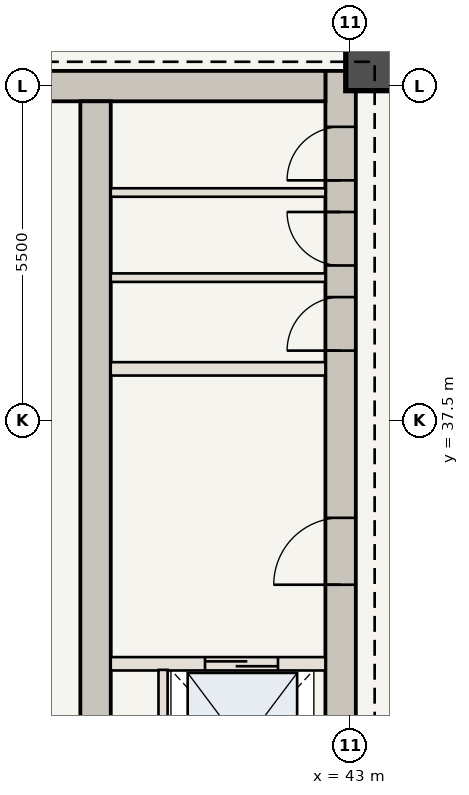
"""IFC4 building model, lengths in metres.
Left out: names, types, materials, properties, quantities, classifications, styles, units other than length and angle.
Written with IfcOpenShell. Run it as: python <this file> out.ifc"""

import sys

from ifc_helpers import new_model, si_unit, direction, frame, frame_2d, origin, origin_2d, place, context, subcontext, project, spatial, rectangle, extrude, element, fill, save


model = new_model("IFC4")
c1 = context("Model", 3, precision=1e-05, world=origin(), true_north=direction((0.0, 1.0)))
c2 = subcontext(c1, "Body", "Model", "MODEL_VIEW")
j1 = project(units=[si_unit("LENGTHUNIT", "METRE"), si_unit("PLANEANGLEUNIT", "RADIAN")], contexts=[c1])
p1 = place(None, origin())
s1 = spatial("IfcSite", under=j1, at=p1, CompositionType="ELEMENT")
p2 = place(p1, origin())
s2 = spatial("IfcBuilding", under=s1, at=p2, CompositionType="ELEMENT")
p3 = place(p2, frame((0.0, 0.0, 225.4)))
s3 = spatial("IfcBuildingStorey", under=s2, at=p3, CompositionType="ELEMENT", Elevation=225.4)
p4 = place(p3, frame((42.84, 30.6, 0.0), z_axis=(0.0, 0.0, 1.0), x_axis=(0.0, 1.0, 0.0)))
e1 = element("IfcWall", 1, at=p4, inside=s3, PredefinedType="SHEAR", context=c2, shape_type="SweptSolid", body=[
    extrude(rectangle(XDim=12.65, YDim=0.5, at=frame_2d((6.325, 0.0))), origin(), (0.0, 0.0, 1.0), 3.85),
])
p5 = place(p4, frame((4.2, 0.0, 0.0)))
e2 = element("IfcOpeningElement", 2, at=p5, cuts=e1, PredefinedType="OPENING", context=c2, shape_type="SweptSolid", body=[
    extrude(rectangle(XDim=1.1, YDim=2.15, at=frame_2d((0.55, 1.075))), frame((0.0, 0.26, 0.0), z_axis=(0.0, -1.0, 0.0), x_axis=(1.0, 0.0, 0.0)), (0.0, 0.0, 1.0), 0.52),
])
p6 = place(p4, frame((8.05, 0.0, 0.0)))
e3 = element("IfcOpeningElement", 3, at=p6, cuts=e1, PredefinedType="OPENING", context=c2, shape_type="SweptSolid", body=[
    extrude(rectangle(XDim=0.88, YDim=2.1, at=frame_2d((0.44, 1.05))), frame((0.0, 0.26, 0.0), z_axis=(0.0, -1.0, 0.0), x_axis=(1.0, 0.0, 0.0)), (0.0, 0.0, 1.0), 0.52),
])
p7 = place(p4, frame((9.45, 0.0, 0.0)))
e4 = element("IfcOpeningElement", 4, at=p7, cuts=e1, PredefinedType="OPENING", context=c2, shape_type="SweptSolid", body=[
    extrude(rectangle(XDim=0.88, YDim=2.1, at=frame_2d((0.44, 1.05))), frame((0.0, 0.26, 0.0), z_axis=(0.0, -1.0, 0.0), x_axis=(1.0, 0.0, 0.0)), (0.0, 0.0, 1.0), 0.52),
])
p8 = place(p4, frame((10.85, 0.0, 0.0)))
e5 = element("IfcOpeningElement", 5, at=p8, cuts=e1, PredefinedType="OPENING", context=c2, shape_type="SweptSolid", body=[
    extrude(rectangle(XDim=0.88, YDim=2.1, at=frame_2d((0.44, 1.05))), frame((0.0, 0.26, 0.0), z_axis=(0.0, -1.0, 0.0), x_axis=(1.0, 0.0, 0.0)), (0.0, 0.0, 1.0), 0.52),
])
p9 = place(p3, frame((37.75, 43.0, 0.0), z_axis=(0.0, 0.0, 1.0), x_axis=(1.0, 0.0, 0.0)))
e6 = element("IfcWall", 6, at=p9, inside=s3, PredefinedType="SHEAR", context=c2, shape_type="SweptSolid", body=[
    extrude(rectangle(XDim=4.84, YDim=0.5, at=frame_2d((2.42, 0.0))), origin(), (0.0, 0.0, 1.0), 3.85),
])
p10 = place(p3, frame((38.81, 30.6, 0.0), z_axis=(0.0, 0.0, 1.0), x_axis=(0.0, 1.0, 0.0)))
e7 = element("IfcWall", 7, at=p10, inside=s3, PredefinedType="SHEAR", context=c2, shape_type="SweptSolid", body=[
    extrude(rectangle(XDim=12.15, YDim=0.5, at=frame_2d((6.075, 0.0))), origin(), (0.0, 0.0, 1.0), 3.85),
])
p11 = place(p3, frame((43.35, 43.35, 0.0), z_axis=(0.0, 0.0, 1.0), x_axis=(1.0, 0.0, 0.0)))
e8 = element("IfcColumn", 8, at=p11, inside=s3, PredefinedType="COLUMN", context=c2, shape_type="SweptSolid", body=[
    extrude(rectangle(XDim=0.85, YDim=0.85, at=origin_2d()), origin(), (0.0, 0.0, 1.0), 3.85),
])
p12 = place(p3, frame((39.06, 33.5, 0.0), z_axis=(0.0, 0.0, 1.0), x_axis=(1.0, 0.0, 0.0)))
e9 = element("IfcWall", 9, at=p12, inside=s3, PredefinedType="STANDARD", context=c2, shape_type="SweptSolid", body=[
    extrude(rectangle(XDim=3.53, YDim=0.22, at=frame_2d((1.765, 0.0))), origin(), (0.0, 0.0, 1.0), 3.685),
])
p13 = place(p12, frame((1.55, 0.0, 0.0)))
e10 = element("IfcOpeningElement", 10, at=p13, cuts=e9, PredefinedType="OPENING", context=c2, shape_type="SweptSolid", body=[
    extrude(rectangle(XDim=1.2, YDim=2.2, at=frame_2d((0.6, 1.1))), frame((0.0, 0.12, 0.0), z_axis=(0.0, -1.0, 0.0), x_axis=(1.0, 0.0, 0.0)), (0.0, 0.0, 1.0), 0.24),
])
p14 = place(p3, frame((39.92, 30.75, 0.0), z_axis=(0.0, 0.0, 1.0), x_axis=(0.0, 1.0, 0.0)))
e11 = element("IfcWall", 11, at=p14, inside=s3, PredefinedType="STANDARD", context=c2, shape_type="SweptSolid", body=[
    extrude(rectangle(XDim=2.65, YDim=0.15, at=frame_2d((1.325, 0.0))), origin(), (0.0, 0.0, 1.0), 3.685),
])
p15 = place(p3, frame((39.06, 38.35, 0.0), z_axis=(0.0, 0.0, 1.0), x_axis=(1.0, 0.0, 0.0)))
e12 = element("IfcWall", 12, at=p15, inside=s3, PredefinedType="STANDARD", context=c2, shape_type="SweptSolid", body=[
    extrude(rectangle(XDim=3.53, YDim=0.22, at=frame_2d((1.765, 0.0))), origin(), (0.0, 0.0, 1.0), 3.685),
])
for number, where, z_axis, x_axis in (
    (13, (39.06, 39.85, 0.0), (0.0, 0.0, 1.0), (1.0, 0.0, 0.0)),
    (14, (39.06, 41.25, 0.0), (0.0, 0.0, 1.0), (1.0, 0.0, 0.0)),
):
    element("IfcWall", number, at=place(p3, frame(where, z_axis=z_axis, x_axis=x_axis)), inside=s3, PredefinedType="STANDARD", context=c2, shape_type="SweptSolid", body=[
        extrude(rectangle(XDim=3.53, YDim=0.14, at=frame_2d((1.765, 0.0))), origin(), (0.0, 0.0, 1.0), 3.685),
    ])
p16 = place(p5, origin())
e15 = element("IfcDoor", 15, at=p16, inside=s3, OperationType="SINGLE_SWING_LEFT", PredefinedType="DOOR", context=c2, shape_type="SweptSolid", body=[
    extrude(rectangle(XDim=1.1, YDim=2.15, at=frame_2d((0.55, 1.075))), frame((0.0, 0.025, 0.0), z_axis=(0.0, -1.0, 0.0), x_axis=(1.0, 0.0, 0.0)), (0.0, 0.0, 1.0), 0.05),
])
fill(e2, e15)
p17 = place(p6, origin())
e16 = element("IfcDoor", 16, at=p17, inside=s3, OperationType="SINGLE_SWING_LEFT", PredefinedType="DOOR", context=c2, shape_type="SweptSolid", body=[
    extrude(rectangle(XDim=0.88, YDim=2.1, at=frame_2d((0.44, 1.05))), frame((0.0, 0.025, 0.0), z_axis=(0.0, -1.0, 0.0), x_axis=(1.0, 0.0, 0.0)), (0.0, 0.0, 1.0), 0.05),
])
fill(e3, e16)
p18 = place(p7, origin())
e17 = element("IfcDoor", 17, at=p18, inside=s3, OperationType="SINGLE_SWING_RIGHT", PredefinedType="DOOR", context=c2, shape_type="SweptSolid", body=[
    extrude(rectangle(XDim=0.88, YDim=2.1, at=frame_2d((0.44, 1.05))), frame((0.0, 0.025, 0.0), z_axis=(0.0, -1.0, 0.0), x_axis=(1.0, 0.0, 0.0)), (0.0, 0.0, 1.0), 0.05),
])
fill(e4, e17)
p19 = place(p8, origin())
e18 = element("IfcDoor", 18, at=p19, inside=s3, OperationType="SINGLE_SWING_LEFT", PredefinedType="DOOR", context=c2, shape_type="SweptSolid", body=[
    extrude(rectangle(XDim=0.88, YDim=2.1, at=frame_2d((0.44, 1.05))), frame((0.0, 0.025, 0.0), z_axis=(0.0, -1.0, 0.0), x_axis=(1.0, 0.0, 0.0)), (0.0, 0.0, 1.0), 0.05),
])
fill(e5, e18)
p20 = place(p13, origin())
e19 = element("IfcDoor", 19, at=p20, inside=s3, OperationType="DOUBLE_DOOR_SLIDING", PredefinedType="DOOR", context=c2, shape_type="SweptSolid", body=[
    extrude(rectangle(XDim=1.2, YDim=2.2, at=frame_2d((0.6, 1.1))), frame((0.0, 0.025, 0.0), z_axis=(0.0, -1.0, 0.0), x_axis=(1.0, 0.0, 0.0)), (0.0, 0.0, 1.0), 0.05),
])
fill(e10, e19)
save(model, sys.argv[1])
